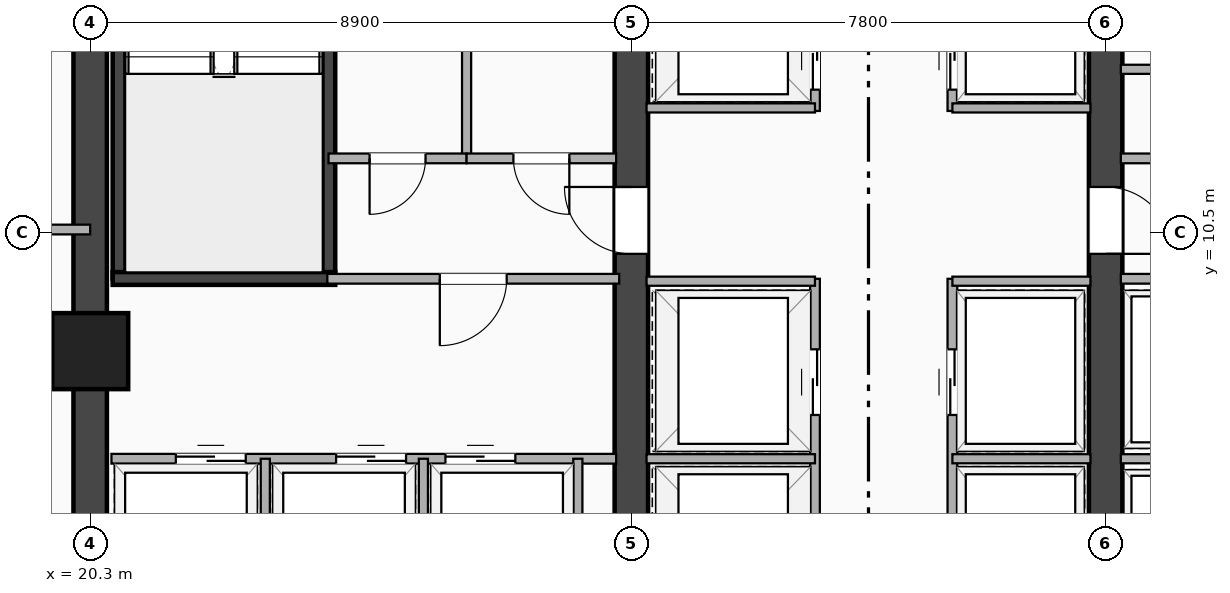
"""IFC4 building model, lengths in metres.
Left out: names, types, materials, properties, quantities, classifications, styles, units other than length and angle.
Written with IfcOpenShell. Run it as: python <this file> out.ifc"""

import sys

from ifc_helpers import new_model, si_unit, direction, frame, frame_2d, origin, origin_2d, place, context, subcontext, project, spatial, rectangle, extrude, element, fill, save


model = new_model("IFC4")
c1 = context("Model", 3, precision=1e-05, world=origin(), true_north=direction((0.0, 1.0)))
c2 = subcontext(c1, "Body", "Model", "MODEL_VIEW")
j1 = project(units=[si_unit("LENGTHUNIT", "METRE"), si_unit("PLANEANGLEUNIT", "RADIAN")], contexts=[c1])
p1 = place(None, origin())
s1 = spatial("IfcSite", under=j1, at=p1, CompositionType="ELEMENT")
p2 = place(p1, origin())
s2 = spatial("IfcBuilding", under=s1, at=p2, CompositionType="ELEMENT")
p3 = place(p2, frame((0.0, 0.0, 83.8)))
s3 = spatial("IfcBuildingStorey", under=s2, at=p3, CompositionType="ELEMENT", Elevation=83.8)
p4 = place(p3, frame((20.3, 3.5, 0.0), z_axis=(0.0, 0.0, 1.0), x_axis=(0.0, 1.0, 0.0)))
e1 = element("IfcWall", 1, at=p4, inside=s3, PredefinedType="SHEAR", context=c2, shape_type="SweptSolid", body=[
    extrude(rectangle(XDim=16.9, YDim=0.55, at=frame_2d((8.45, 0.0))), origin(), (0.0, 0.0, 1.0), 4.14),
])
p5 = place(p3, frame((29.2, 3.5, 0.0), z_axis=(0.0, 0.0, 1.0), x_axis=(0.0, 1.0, 0.0)))
e2 = element("IfcWall", 2, at=p5, inside=s3, PredefinedType="SHEAR", context=c2, shape_type="SweptSolid", body=[
    extrude(rectangle(XDim=16.9, YDim=0.55, at=frame_2d((8.45, 0.0))), origin(), (0.0, 0.0, 1.0), 4.14),
])
p6 = place(p5, frame((7.75, 0.0, 0.0), z_axis=(0.0, 0.0, 1.0), x_axis=(-1.0, 0.0, 0.0)))
e3 = element("IfcOpeningElement", 3, at=p6, cuts=e2, PredefinedType="OPENING", context=c2, shape_type="SweptSolid", body=[
    extrude(rectangle(XDim=1.1, YDim=2.15, at=frame_2d((0.55, 1.075))), frame((0.0, 0.285, 0.0), z_axis=(0.0, -1.0, 0.0), x_axis=(1.0, 0.0, 0.0)), (0.0, 0.0, 1.0), 0.57),
])
p7 = place(p3, frame((37.0, 3.5, 0.0), z_axis=(0.0, 0.0, 1.0), x_axis=(0.0, 1.0, 0.0)))
e4 = element("IfcWall", 4, at=p7, inside=s3, PredefinedType="SHEAR", context=c2, shape_type="SweptSolid", body=[
    extrude(rectangle(XDim=16.9, YDim=0.55, at=frame_2d((8.45, 0.0))), origin(), (0.0, 0.0, 1.0), 4.14),
])
p8 = place(p7, frame((6.65, 0.0, 0.0)))
e5 = element("IfcOpeningElement", 5, at=p8, cuts=e4, PredefinedType="OPENING", context=c2, shape_type="SweptSolid", body=[
    extrude(rectangle(XDim=1.1, YDim=2.15, at=frame_2d((0.55, 1.075))), frame((0.0, 0.285, 0.0), z_axis=(0.0, -1.0, 0.0), x_axis=(1.0, 0.0, 0.0)), (0.0, 0.0, 1.0), 0.57),
])
for number, where, z_axis, x_axis in (
    (6, (20.775, 9.745, 0.0), (0.0, 0.0, 1.0), (0.0, 1.0, 0.0)),
    (7, (24.225, 9.745, 0.0), (0.0, 0.0, 1.0), (0.0, 1.0, 0.0)),
):
    element("IfcWall", number, at=place(p3, frame(where, z_axis=z_axis, x_axis=x_axis)), inside=s3, PredefinedType="SHEAR", context=c2, shape_type="SweptSolid", body=[
        extrude(rectangle(XDim=8.01, YDim=0.21, at=frame_2d((4.005, 0.0))), origin(), (0.0, 0.0, 1.0), 4.14),
    ])
p9 = place(p3, frame((20.67, 9.745, 0.0), z_axis=(0.0, 0.0, 1.0), x_axis=(1.0, 0.0, 0.0)))
e8 = element("IfcWall", 8, at=p9, inside=s3, PredefinedType="SHEAR", context=c2, shape_type="SweptSolid", body=[
    extrude(rectangle(XDim=3.66, YDim=0.21, at=frame_2d((1.83, 0.0))), origin(), (0.0, 0.0, 1.0), 4.14),
])
p10 = place(p3, frame((20.3, 8.55, -0.26), z_axis=(0.0, 0.0, 1.0), x_axis=(1.0, 0.0, 0.0)))
e9 = element("IfcColumn", 9, at=p10, inside=s3, PredefinedType="COLUMN", context=c2, shape_type="SweptSolid", body=[
    extrude(rectangle(XDim=1.25, YDim=1.25, at=origin_2d()), origin(), (0.0, 0.0, 1.0), 4.4),
])
p11 = place(p3, frame((26.49, 11.72, 0.0), z_axis=(0.0, 0.0, 1.0), x_axis=(0.0, 1.0, 0.0)))
e10 = element("IfcWall", 10, at=p11, inside=s3, PredefinedType="PARTITIONING", context=c2, shape_type="SweptSolid", body=[
    extrude(rectangle(XDim=2.93, YDim=0.15, at=frame_2d((1.465, 0.0))), origin(), (0.0, 0.0, 1.0), 4.14),
])
p12 = place(p3, frame((24.22, 11.72, 0.0), z_axis=(0.0, 0.0, 1.0), x_axis=(1.0, 0.0, 0.0)))
e11 = element("IfcWall", 11, at=p12, inside=s3, PredefinedType="PARTITIONING", context=c2, shape_type="SweptSolid", body=[
    extrude(rectangle(XDim=2.271, YDim=0.16, at=frame_2d((1.135, 0.0))), origin(), (0.0, 0.0, 1.0), 4.14),
])
p13 = place(p12, frame((0.675, 0.0, 0.0)))
e12 = element("IfcOpeningElement", 12, at=p13, cuts=e11, PredefinedType="OPENING", context=c2, shape_type="SweptSolid", body=[
    extrude(rectangle(XDim=0.92, YDim=2.08, at=frame_2d((0.46, 1.04))), frame((0.0, 0.09, 0.0), z_axis=(0.0, -1.0, 0.0), x_axis=(1.0, 0.0, 0.0)), (0.0, 0.0, 1.0), 0.18),
])
p14 = place(p3, frame((26.49, 11.72, 0.0), z_axis=(0.0, 0.0, 1.0), x_axis=(1.0, 0.0, 0.0)))
e13 = element("IfcWall", 13, at=p14, inside=s3, PredefinedType="PARTITIONING", context=c2, shape_type="SweptSolid", body=[
    extrude(rectangle(XDim=2.459, YDim=0.16, at=frame_2d((1.23, 0.0))), origin(), (0.0, 0.0, 1.0), 4.14),
])
p15 = place(p14, frame((0.77, 0.0, 0.0)))
e14 = element("IfcOpeningElement", 14, at=p15, cuts=e13, PredefinedType="OPENING", context=c2, shape_type="SweptSolid", body=[
    extrude(rectangle(XDim=0.92, YDim=2.08, at=frame_2d((0.46, 1.04))), frame((0.0, 0.09, 0.0), z_axis=(0.0, -1.0, 0.0), x_axis=(1.0, 0.0, 0.0)), (0.0, 0.0, 1.0), 0.18),
])
p16 = place(p3, frame((37.25, 11.72, 0.0), z_axis=(0.0, 0.0, 1.0), x_axis=(1.0, 0.0, 0.0)))
e15 = element("IfcWall", 15, at=p16, inside=s3, PredefinedType="PARTITIONING", context=c2, shape_type="SweptSolid", body=[
    extrude(rectangle(XDim=3.61, YDim=0.16, at=frame_2d((1.805, 0.0))), origin(), (0.0, 0.0, 1.0), 4.14),
])
p17 = place(p16, frame((1.345, 0.0, 0.0)))
e16 = element("IfcOpeningElement", 16, at=p17, cuts=e15, PredefinedType="OPENING", context=c2, shape_type="SweptSolid", body=[
    extrude(rectangle(XDim=0.92, YDim=2.08, at=frame_2d((0.46, 1.04))), frame((0.0, 0.09, 0.0), z_axis=(0.0, -1.0, 0.0), x_axis=(1.0, 0.0, 0.0)), (0.0, 0.0, 1.0), 0.18),
])
p18 = place(p3, frame((37.25, 13.185, 0.0), z_axis=(0.0, 0.0, 1.0), x_axis=(1.0, 0.0, 0.0)))
e17 = element("IfcWall", 17, at=p18, inside=s3, PredefinedType="PARTITIONING", context=c2, shape_type="SweptSolid", body=[
    extrude(rectangle(XDim=3.61, YDim=0.15, at=frame_2d((1.805, 0.0))), origin(), (0.0, 0.0, 1.0), 4.14),
])
p19 = place(p18, frame((1.365, 0.0, 0.0)))
e18 = element("IfcOpeningElement", 18, at=p19, cuts=e17, PredefinedType="OPENING", context=c2, shape_type="SweptSolid", body=[
    extrude(rectangle(XDim=0.88, YDim=2.08, at=frame_2d((0.44, 1.04))), frame((0.0, 0.085, 0.0), z_axis=(0.0, -1.0, 0.0), x_axis=(1.0, 0.0, 0.0)), (0.0, 0.0, 1.0), 0.17),
])
p20 = place(p3, frame((20.65, 6.78, 0.0), z_axis=(0.0, 0.0, 1.0), x_axis=(1.0, 0.0, 0.0)))
e19 = element("IfcWall", 19, at=p20, inside=s3, PredefinedType="PARTITIONING", context=c2, shape_type="SweptSolid", body=[
    extrude(rectangle(XDim=8.3, YDim=0.16, at=frame_2d((4.15, 0.0))), origin(), (0.0, 0.0, 1.0), 3.213),
])
p21 = place(p20, frame((3.695, 0.0, 0.0)))
e20 = element("IfcOpeningElement", 20, at=p21, cuts=e19, PredefinedType="OPENING", context=c2, shape_type="SweptSolid", body=[
    extrude(rectangle(XDim=1.15, YDim=2.2, at=frame_2d((0.575, 1.1))), frame((0.0, 0.09, 0.0), z_axis=(0.0, -1.0, 0.0), x_axis=(1.0, 0.0, 0.0)), (0.0, 0.0, 1.0), 0.18),
])
p22 = place(p20, frame((5.492, 0.0, 0.0)))
e21 = element("IfcOpeningElement", 21, at=p22, cuts=e19, PredefinedType="OPENING", context=c2, shape_type="SweptSolid", body=[
    extrude(rectangle(XDim=1.15, YDim=2.2, at=frame_2d((0.575, 1.1))), frame((0.0, 0.09, 0.0), z_axis=(0.0, -1.0, 0.0), x_axis=(1.0, 0.0, 0.0)), (0.0, 0.0, 1.0), 0.18),
])
p23 = place(p20, frame((1.059, 0.0, 0.0)))
e22 = element("IfcOpeningElement", 22, at=p23, cuts=e19, PredefinedType="OPENING", context=c2, shape_type="SweptSolid", body=[
    extrude(rectangle(XDim=1.15, YDim=2.2, at=frame_2d((0.575, 1.1))), frame((0.0, 0.09, 0.0), z_axis=(0.0, -1.0, 0.0), x_axis=(1.0, 0.0, 0.0)), (0.0, 0.0, 1.0), 0.18),
])
for number, where, z_axis, x_axis in (
    (23, (23.18, 3.9, 0.0), (0.0, 0.0, 1.0), (0.0, 1.0, 0.0)),
    (24, (25.78, 3.9, 0.0), (0.0, 0.0, 1.0), (0.0, 1.0, 0.0)),
    (25, (28.32, 3.9, 0.0), (0.0, 0.0, 1.0), (0.0, 1.0, 0.0)),
):
    element("IfcWall", number, at=place(p3, frame(where, z_axis=z_axis, x_axis=x_axis)), inside=s3, PredefinedType="PARTITIONING", context=c2, shape_type="SweptSolid", body=[
        extrude(rectangle(XDim=2.88, YDim=0.15, at=frame_2d((1.44, 0.0))), origin(), (0.0, 0.0, 1.0), 4.14),
    ])
p24 = place(p3, frame((24.2, 9.74, 0.0), z_axis=(0.0, 0.0, 1.0), x_axis=(1.0, 0.0, 0.0)))
e26 = element("IfcWall", 26, at=p24, inside=s3, PredefinedType="PARTITIONING", context=c2, shape_type="SweptSolid", body=[
    extrude(rectangle(XDim=4.8, YDim=0.16, at=frame_2d((2.4, 0.0))), origin(), (0.0, 0.0, 1.0), 4.14),
])
p25 = place(p24, frame((1.85, 0.0, 0.0)))
e27 = element("IfcOpeningElement", 27, at=p25, cuts=e26, PredefinedType="OPENING", context=c2, shape_type="SweptSolid", body=[
    extrude(rectangle(XDim=1.1, YDim=2.15, at=frame_2d((0.55, 1.075))), frame((0.0, 0.09, 0.0), z_axis=(0.0, -1.0, 0.0), x_axis=(1.0, 0.0, 0.0)), (0.0, 0.0, 1.0), 0.18),
])
p26 = place(p3, frame((37.25, 6.78, 0.0), z_axis=(0.0, 0.0, 1.0), x_axis=(1.0, 0.0, 0.0)))
e28 = element("IfcWall", 28, at=p26, inside=s3, PredefinedType="PARTITIONING", context=c2, shape_type="SweptSolid", body=[
    extrude(rectangle(XDim=2.17, YDim=0.15, at=frame_2d((1.085, 0.0))), origin(), (0.0, 0.0, 1.0), 4.14),
])
p27 = place(p3, frame((37.25, 9.74, 0.0), z_axis=(0.0, 0.0, 1.0), x_axis=(1.0, 0.0, 0.0)))
e29 = element("IfcWall", 29, at=p27, inside=s3, PredefinedType="PARTITIONING", context=c2, shape_type="SweptSolid", body=[
    extrude(rectangle(XDim=2.17, YDim=0.16, at=frame_2d((1.085, 0.0))), origin(), (0.0, 0.0, 1.0), 4.14),
])
p28 = place(p3, frame((32.22, 3.9, 0.0), z_axis=(0.0, 0.0, 1.0), x_axis=(0.0, 1.0, 0.0)))
e30 = element("IfcWall", 30, at=p28, inside=s3, PredefinedType="PARTITIONING", context=c2, shape_type="SweptSolid", body=[
    extrude(rectangle(XDim=5.84, YDim=0.16, at=frame_2d((2.92, 0.0))), origin(), (0.0, 0.0, 1.0), 4.14),
])
p29 = place(p28, frame((1.78, 0.0, 0.0), z_axis=(0.0, 0.0, 1.0), x_axis=(-1.0, 0.0, 0.0)))
e31 = element("IfcOpeningElement", 31, at=p29, cuts=e30, PredefinedType="OPENING", context=c2, shape_type="SweptSolid", body=[
    extrude(rectangle(XDim=1.08, YDim=2.16, at=frame_2d((0.54, 1.08))), frame((0.0, 0.09, 0.0), z_axis=(0.0, -1.0, 0.0), x_axis=(1.0, 0.0, 0.0)), (0.0, 0.0, 1.0), 0.18),
])
p30 = place(p28, frame((4.68, 0.0, 0.0), z_axis=(0.0, 0.0, 1.0), x_axis=(-1.0, 0.0, 0.0)))
e32 = element("IfcOpeningElement", 32, at=p30, cuts=e30, PredefinedType="OPENING", context=c2, shape_type="SweptSolid", body=[
    extrude(rectangle(XDim=1.08, YDim=2.16, at=frame_2d((0.54, 1.08))), frame((0.0, 0.09, 0.0), z_axis=(0.0, -1.0, 0.0), x_axis=(1.0, 0.0, 0.0)), (0.0, 0.0, 1.0), 0.18),
])
p31 = place(p3, frame((34.48, 3.9, 0.0), z_axis=(0.0, 0.0, 1.0), x_axis=(0.0, 1.0, 0.0)))
e33 = element("IfcWall", 33, at=p31, inside=s3, PredefinedType="PARTITIONING", context=c2, shape_type="SweptSolid", body=[
    extrude(rectangle(XDim=5.84, YDim=0.16, at=frame_2d((2.92, 0.0))), origin(), (0.0, 0.0, 1.0), 4.14),
])
p32 = place(p31, frame((0.7, 0.0, 0.0)))
e34 = element("IfcOpeningElement", 34, at=p32, cuts=e33, PredefinedType="OPENING", context=c2, shape_type="SweptSolid", body=[
    extrude(rectangle(XDim=1.08, YDim=2.16, at=frame_2d((0.54, 1.08))), frame((0.0, 0.09, 0.0), z_axis=(0.0, -1.0, 0.0), x_axis=(1.0, 0.0, 0.0)), (0.0, 0.0, 1.0), 0.18),
])
p33 = place(p31, frame((3.6, 0.0, 0.0)))
e35 = element("IfcOpeningElement", 35, at=p33, cuts=e33, PredefinedType="OPENING", context=c2, shape_type="SweptSolid", body=[
    extrude(rectangle(XDim=1.08, YDim=2.16, at=frame_2d((0.54, 1.08))), frame((0.0, 0.09, 0.0), z_axis=(0.0, -1.0, 0.0), x_axis=(1.0, 0.0, 0.0)), (0.0, 0.0, 1.0), 0.18),
])
p34 = place(p3, frame((29.45, 6.78, 0.0), z_axis=(0.0, 0.0, 1.0), x_axis=(1.0, 0.0, 0.0)))
e36 = element("IfcWall", 36, at=p34, inside=s3, PredefinedType="PARTITIONING", context=c2, shape_type="SweptSolid", body=[
    extrude(rectangle(XDim=2.77, YDim=0.15, at=frame_2d((1.385, 0.0))), origin(), (0.0, 0.0, 1.0), 4.14),
])
p35 = place(p3, frame((34.48, 6.78, 0.0), z_axis=(0.0, 0.0, 1.0), x_axis=(1.0, 0.0, 0.0)))
e37 = element("IfcWall", 37, at=p35, inside=s3, PredefinedType="PARTITIONING", context=c2, shape_type="SweptSolid", body=[
    extrude(rectangle(XDim=2.27, YDim=0.15, at=frame_2d((1.135, 0.0))), origin(), (0.0, 0.0, 1.0), 4.14),
])
p36 = place(p3, frame((29.45, 9.7, 0.0), z_axis=(0.0, 0.0, 1.0), x_axis=(1.0, 0.0, 0.0)))
e38 = element("IfcWall", 38, at=p36, inside=s3, PredefinedType="PARTITIONING", context=c2, shape_type="SweptSolid", body=[
    extrude(rectangle(XDim=2.77, YDim=0.15, at=frame_2d((1.385, 0.0))), origin(), (0.0, 0.0, 1.0), 4.14),
])
p37 = place(p3, frame((34.48, 9.7, 0.0), z_axis=(0.0, 0.0, 1.0), x_axis=(1.0, 0.0, 0.0)))
e39 = element("IfcWall", 39, at=p37, inside=s3, PredefinedType="PARTITIONING", context=c2, shape_type="SweptSolid", body=[
    extrude(rectangle(XDim=2.27, YDim=0.15, at=frame_2d((1.135, 0.0))), origin(), (0.0, 0.0, 1.0), 4.14),
])
p38 = place(p3, frame((32.22, 12.5, 0.0), z_axis=(0.0, 0.0, 1.0), x_axis=(0.0, 1.0, 0.0)))
e40 = element("IfcWall", 40, at=p38, inside=s3, PredefinedType="PARTITIONING", context=c2, shape_type="SweptSolid", body=[
    extrude(rectangle(XDim=7.92, YDim=0.16, at=frame_2d((3.96, 0.0))), origin(), (0.0, 0.0, 1.0), 3.514),
])
p39 = place(p38, frame((1.43, 0.0, 0.0), z_axis=(0.0, 0.0, 1.0), x_axis=(-1.0, 0.0, 0.0)))
e41 = element("IfcOpeningElement", 41, at=p39, cuts=e40, PredefinedType="OPENING", context=c2, shape_type="SweptSolid", body=[
    extrude(rectangle(XDim=1.08, YDim=2.16, at=frame_2d((0.54, 1.08))), frame((0.0, 0.09, 0.0), z_axis=(0.0, -1.0, 0.0), x_axis=(1.0, 0.0, 0.0)), (0.0, 0.0, 1.0), 0.18),
])
p40 = place(p38, frame((4.33, 0.0, 0.0), z_axis=(0.0, 0.0, 1.0), x_axis=(-1.0, 0.0, 0.0)))
e42 = element("IfcOpeningElement", 42, at=p40, cuts=e40, PredefinedType="OPENING", context=c2, shape_type="SweptSolid", body=[
    extrude(rectangle(XDim=1.08, YDim=2.16, at=frame_2d((0.54, 1.08))), frame((0.0, 0.09, 0.0), z_axis=(0.0, -1.0, 0.0), x_axis=(1.0, 0.0, 0.0)), (0.0, 0.0, 1.0), 0.18),
])
p41 = place(p38, frame((6.1, 0.0, 0.0)))
e43 = element("IfcOpeningElement", 43, at=p41, cuts=e40, PredefinedType="OPENING", context=c2, shape_type="SweptSolid", body=[
    extrude(rectangle(XDim=0.88, YDim=2.08, at=frame_2d((0.44, 1.04))), frame((0.0, 0.09, 0.0), z_axis=(0.0, -1.0, 0.0), x_axis=(1.0, 0.0, 0.0)), (0.0, 0.0, 1.0), 0.18),
])
p42 = place(p3, frame((34.48, 12.5, 0.0), z_axis=(0.0, 0.0, 1.0), x_axis=(0.0, 1.0, 0.0)))
e44 = element("IfcWall", 44, at=p42, inside=s3, PredefinedType="PARTITIONING", context=c2, shape_type="SweptSolid", body=[
    extrude(rectangle(XDim=7.92, YDim=0.16, at=frame_2d((3.96, 0.0))), origin(), (0.0, 0.0, 1.0), 3.514),
])
p43 = place(p42, frame((0.35, 0.0, 0.0)))
e45 = element("IfcOpeningElement", 45, at=p43, cuts=e44, PredefinedType="OPENING", context=c2, shape_type="SweptSolid", body=[
    extrude(rectangle(XDim=1.08, YDim=2.16, at=frame_2d((0.54, 1.08))), frame((0.0, 0.09, 0.0), z_axis=(0.0, -1.0, 0.0), x_axis=(1.0, 0.0, 0.0)), (0.0, 0.0, 1.0), 0.18),
])
p44 = place(p42, frame((3.25, 0.0, 0.0)))
e46 = element("IfcOpeningElement", 46, at=p44, cuts=e44, PredefinedType="OPENING", context=c2, shape_type="SweptSolid", body=[
    extrude(rectangle(XDim=1.08, YDim=2.16, at=frame_2d((0.54, 1.08))), frame((0.0, 0.09, 0.0), z_axis=(0.0, -1.0, 0.0), x_axis=(1.0, 0.0, 0.0)), (0.0, 0.0, 1.0), 0.18),
])
p45 = place(p42, frame((6.98, 0.0, 0.0), z_axis=(0.0, 0.0, 1.0), x_axis=(-1.0, 0.0, 0.0)))
e47 = element("IfcOpeningElement", 47, at=p45, cuts=e44, PredefinedType="OPENING", context=c2, shape_type="SweptSolid", body=[
    extrude(rectangle(XDim=0.88, YDim=2.08, at=frame_2d((0.44, 1.04))), frame((0.0, 0.09, 0.0), z_axis=(0.0, -1.0, 0.0), x_axis=(1.0, 0.0, 0.0)), (0.0, 0.0, 1.0), 0.18),
])
p46 = place(p3, frame((29.45, 12.55, 0.0), z_axis=(0.0, 0.0, 1.0), x_axis=(1.0, 0.0, 0.0)))
e48 = element("IfcWall", 48, at=p46, inside=s3, PredefinedType="PARTITIONING", context=c2, shape_type="SweptSolid", body=[
    extrude(rectangle(XDim=2.77, YDim=0.15, at=frame_2d((1.385, 0.0))), origin(), (0.0, 0.0, 1.0), 4.14),
])
p47 = place(p3, frame((34.48, 12.55, 0.0), z_axis=(0.0, 0.0, 1.0), x_axis=(1.0, 0.0, 0.0)))
e49 = element("IfcWall", 49, at=p47, inside=s3, PredefinedType="PARTITIONING", context=c2, shape_type="SweptSolid", body=[
    extrude(rectangle(XDim=2.27, YDim=0.15, at=frame_2d((1.135, 0.0))), origin(), (0.0, 0.0, 1.0), 4.14),
])
p48 = place(p3, frame((16.5, 10.55, 0.0), z_axis=(0.0, 0.0, 1.0), x_axis=(1.0, 0.0, 0.0)))
e50 = element("IfcWall", 50, at=p48, inside=s3, PredefinedType="PARTITIONING", context=c2, shape_type="SweptSolid", body=[
    extrude(rectangle(XDim=3.8, YDim=0.16, at=frame_2d((1.9, 0.0))), origin(), (0.0, 0.0, 1.0), 3.213),
])
p49 = place(p48, frame((1.37, 0.0, 0.0), z_axis=(0.0, 0.0, 1.0), x_axis=(-1.0, 0.0, 0.0)))
e51 = element("IfcOpeningElement", 51, at=p49, cuts=e50, PredefinedType="OPENING", context=c2, shape_type="SweptSolid", body=[
    extrude(rectangle(XDim=0.92, YDim=2.08, at=frame_2d((0.46, 1.04))), frame((0.0, 0.09, 0.0), z_axis=(0.0, -1.0, 0.0), x_axis=(1.0, 0.0, 0.0)), (0.0, 0.0, 1.0), 0.18),
])
p50 = place(p6, origin())
e52 = element("IfcDoor", 52, at=p50, inside=s3, OperationType="SINGLE_SWING_RIGHT", PredefinedType="DOOR", context=c2, shape_type="SweptSolid", body=[
    extrude(rectangle(XDim=1.1, YDim=2.15, at=frame_2d((0.55, 1.075))), frame((0.0, 0.025, 0.0), z_axis=(0.0, -1.0, 0.0), x_axis=(1.0, 0.0, 0.0)), (0.0, 0.0, 1.0), 0.05),
])
fill(e3, e52)
p51 = place(p8, origin())
e53 = element("IfcDoor", 53, at=p51, inside=s3, OperationType="SINGLE_SWING_LEFT", PredefinedType="DOOR", context=c2, shape_type="SweptSolid", body=[
    extrude(rectangle(XDim=1.1, YDim=2.15, at=frame_2d((0.55, 1.075))), frame((0.0, 0.025, 0.0), z_axis=(0.0, -1.0, 0.0), x_axis=(1.0, 0.0, 0.0)), (0.0, 0.0, 1.0), 0.05),
])
fill(e5, e53)
p52 = place(p13, origin())
e54 = element("IfcDoor", 54, at=p52, inside=s3, OperationType="SINGLE_SWING_LEFT", PredefinedType="DOOR", context=c2, shape_type="SweptSolid", body=[
    extrude(rectangle(XDim=0.92, YDim=2.08, at=frame_2d((0.46, 1.04))), frame((0.0, 0.025, 0.0), z_axis=(0.0, -1.0, 0.0), x_axis=(1.0, 0.0, 0.0)), (0.0, 0.0, 1.0), 0.05),
])
fill(e12, e54)
p53 = place(p15, origin())
e55 = element("IfcDoor", 55, at=p53, inside=s3, OperationType="SINGLE_SWING_RIGHT", PredefinedType="DOOR", context=c2, shape_type="SweptSolid", body=[
    extrude(rectangle(XDim=0.92, YDim=2.08, at=frame_2d((0.46, 1.04))), frame((0.0, 0.025, 0.0), z_axis=(0.0, -1.0, 0.0), x_axis=(1.0, 0.0, 0.0)), (0.0, 0.0, 1.0), 0.05),
])
fill(e14, e55)
p54 = place(p21, origin())
e56 = element("IfcDoor", 56, at=p54, inside=s3, OperationType="DOUBLE_DOOR_SLIDING", PredefinedType="DOOR", context=c2, shape_type="SweptSolid", body=[
    extrude(rectangle(XDim=1.15, YDim=2.2, at=frame_2d((0.575, 1.1))), frame((0.0, 0.025, 0.0), z_axis=(0.0, -1.0, 0.0), x_axis=(1.0, 0.0, 0.0)), (0.0, 0.0, 1.0), 0.05),
])
fill(e20, e56)
p55 = place(p22, origin())
e57 = element("IfcDoor", 57, at=p55, inside=s3, OperationType="DOUBLE_DOOR_SLIDING", PredefinedType="DOOR", context=c2, shape_type="SweptSolid", body=[
    extrude(rectangle(XDim=1.15, YDim=2.2, at=frame_2d((0.575, 1.1))), frame((0.0, 0.025, 0.0), z_axis=(0.0, -1.0, 0.0), x_axis=(1.0, 0.0, 0.0)), (0.0, 0.0, 1.0), 0.05),
])
fill(e21, e57)
p56 = place(p23, origin())
e58 = element("IfcDoor", 58, at=p56, inside=s3, OperationType="DOUBLE_DOOR_SLIDING", PredefinedType="DOOR", context=c2, shape_type="SweptSolid", body=[
    extrude(rectangle(XDim=1.15, YDim=2.2, at=frame_2d((0.575, 1.1))), frame((0.0, 0.025, 0.0), z_axis=(0.0, -1.0, 0.0), x_axis=(1.0, 0.0, 0.0)), (0.0, 0.0, 1.0), 0.05),
])
fill(e22, e58)
p57 = place(p25, origin())
e59 = element("IfcDoor", 59, at=p57, inside=s3, OperationType="SINGLE_SWING_LEFT", PredefinedType="DOOR", context=c2, shape_type="SweptSolid", body=[
    extrude(rectangle(XDim=1.1, YDim=2.15, at=frame_2d((0.55, 1.075))), frame((0.0, 0.025, 0.0), z_axis=(0.0, -1.0, 0.0), x_axis=(1.0, 0.0, 0.0)), (0.0, 0.0, 1.0), 0.05),
])
fill(e27, e59)
p58 = place(p30, origin())
e60 = element("IfcDoor", 60, at=p58, inside=s3, OperationType="DOUBLE_DOOR_SLIDING", PredefinedType="DOOR", context=c2, shape_type="SweptSolid", body=[
    extrude(rectangle(XDim=1.08, YDim=2.16, at=frame_2d((0.54, 1.08))), frame((0.0, 0.025, 0.0), z_axis=(0.0, -1.0, 0.0), x_axis=(1.0, 0.0, 0.0)), (0.0, 0.0, 1.0), 0.05),
])
fill(e32, e60)
p59 = place(p33, origin())
e61 = element("IfcDoor", 61, at=p59, inside=s3, OperationType="DOUBLE_DOOR_SLIDING", PredefinedType="DOOR", context=c2, shape_type="SweptSolid", body=[
    extrude(rectangle(XDim=1.08, YDim=2.16, at=frame_2d((0.54, 1.08))), frame((0.0, 0.025, 0.0), z_axis=(0.0, -1.0, 0.0), x_axis=(1.0, 0.0, 0.0)), (0.0, 0.0, 1.0), 0.05),
])
fill(e35, e61)
p60 = place(p39, origin())
e62 = element("IfcDoor", 62, at=p60, inside=s3, OperationType="DOUBLE_DOOR_SLIDING", PredefinedType="DOOR", context=c2, shape_type="SweptSolid", body=[
    extrude(rectangle(XDim=1.08, YDim=2.16, at=frame_2d((0.54, 1.08))), frame((0.0, 0.025, 0.0), z_axis=(0.0, -1.0, 0.0), x_axis=(1.0, 0.0, 0.0)), (0.0, 0.0, 1.0), 0.05),
])
fill(e41, e62)
p61 = place(p43, origin())
e63 = element("IfcDoor", 63, at=p61, inside=s3, OperationType="DOUBLE_DOOR_SLIDING", PredefinedType="DOOR", context=c2, shape_type="SweptSolid", body=[
    extrude(rectangle(XDim=1.08, YDim=2.16, at=frame_2d((0.54, 1.08))), frame((0.0, 0.025, 0.0), z_axis=(0.0, -1.0, 0.0), x_axis=(1.0, 0.0, 0.0)), (0.0, 0.0, 1.0), 0.05),
])
fill(e45, e63)
save(model, sys.argv[1])
